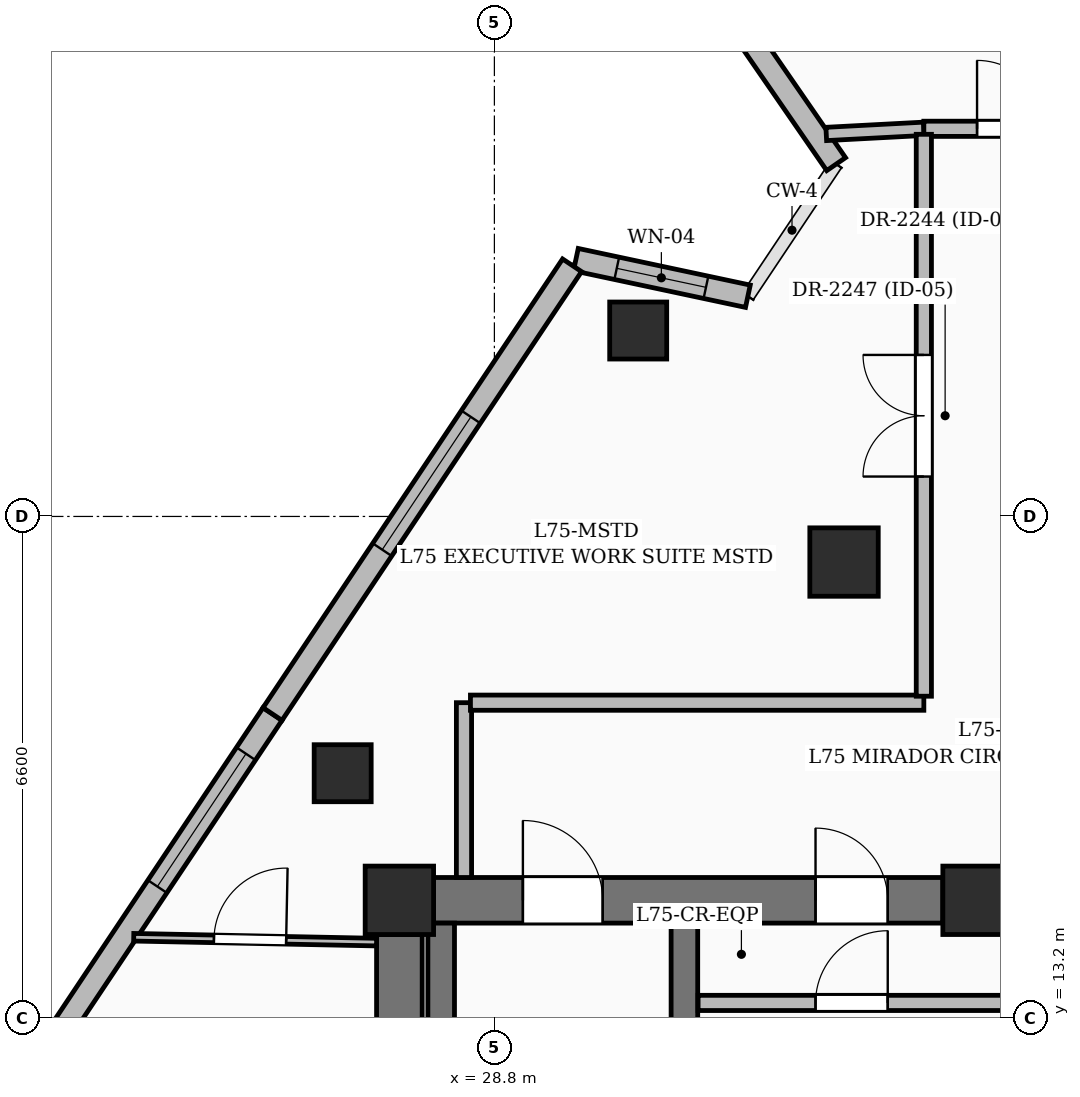
"""IFC4 building model, lengths in metres.
Left out: names, types, materials, properties, quantities, classifications, styles, units other than length and angle.
Written with IfcOpenShell. Run it as: python <this file> out.ifc"""

import sys

from ifc_helpers import new_model, si_unit, direction, frame, frame_2d, origin, origin_2d, place, context, subcontext, project, spatial, rectangle, extrude, element, fill, save


model = new_model("IFC4")
c1 = context("Model", 3, precision=1e-05, world=origin(), true_north=direction((0.0, 1.0)))
c2 = subcontext(c1, "Body", "Model", "MODEL_VIEW")
j1 = project(units=[si_unit("LENGTHUNIT", "METRE"), si_unit("PLANEANGLEUNIT", "RADIAN")], contexts=[c1])
p1 = place(None, origin())
s1 = spatial("IfcSite", under=j1, at=p1, CompositionType="ELEMENT")
p2 = place(p1, origin())
s2 = spatial("IfcBuilding", under=s1, at=p2, CompositionType="ELEMENT")
p3 = place(p2, frame((0.0, 0.0, 289.5)))
s3 = spatial("IfcBuildingStorey", under=s2, at=p3, CompositionType="ELEMENT", Elevation=289.5)
for number, where, z_axis, x_axis in (
    (1, (27.55, 14.75, 0.0), (0.0, 0.0, 1.0), (1.0, 0.0, 0.0)),
    (2, (35.15, 14.75, 0.0), (0.0, 0.0, 1.0), (1.0, 0.0, 0.0)),
    (3, (33.4, 19.2, 0.0), (0.0, 0.0, 1.0), (1.0, 0.0, 0.0)),
):
    element("IfcColumn", number, at=place(p3, frame(where, z_axis=z_axis, x_axis=x_axis)), inside=s3, PredefinedType="COLUMN", context=c2, shape_type="SweptSolid", body=[
        extrude(rectangle(XDim=0.9, YDim=0.9, at=origin_2d()), origin(), (0.0, 0.0, 1.0), 4.5),
    ])
p4 = place(p3, frame((28.0, 14.75, 0.0), z_axis=(0.0, 0.0, 1.0), x_axis=(1.0, 0.0, 0.0)))
e4 = element("IfcWall", 4, at=p4, inside=s3, PredefinedType="SHEAR", context=c2, shape_type="SweptSolid", body=[
    extrude(rectangle(XDim=6.7, YDim=0.6, at=frame_2d((3.35, 0.0))), origin(), (0.0, 0.0, 1.0), 4.5),
])
p5 = place(p4, frame((1.175, 0.0, 0.0)))
e5 = element("IfcOpeningElement", 5, at=p5, cuts=e4, PredefinedType="OPENING", context=c2, shape_type="SweptSolid", body=[
    extrude(rectangle(XDim=1.05, YDim=2.15, at=frame_2d((0.525, 1.075))), frame((0.0, 0.31, 0.0), z_axis=(0.0, -1.0, 0.0), x_axis=(1.0, 0.0, 0.0)), (0.0, 0.0, 1.0), 0.62),
])
p6 = place(p4, frame((5.025, 0.0, 0.0)))
e6 = element("IfcOpeningElement", 6, at=p6, cuts=e4, PredefinedType="OPENING", context=c2, shape_type="SweptSolid", body=[
    extrude(rectangle(XDim=0.95, YDim=2.15, at=frame_2d((0.475, 1.075))), frame((0.0, 0.31, 0.0), z_axis=(0.0, -1.0, 0.0), x_axis=(1.0, 0.0, 0.0)), (0.0, 0.0, 1.0), 0.62),
])
p7 = place(p3, frame((27.55, 5.0, 0.0), z_axis=(0.0, 0.0, 1.0), x_axis=(0.0, 1.0, 0.0)))
e7 = element("IfcWall", 7, at=p7, inside=s3, PredefinedType="SHEAR", context=c2, shape_type="SweptSolid", body=[
    extrude(rectangle(XDim=9.3, YDim=0.6, at=frame_2d((4.65, 0.0))), origin(), (0.0, 0.0, 1.0), 4.5),
])
p8 = place(p3, frame((28.1, 5.2, 0.0), z_axis=(0.0, 0.0, 1.0), x_axis=(0.0, 1.0, 0.0)))
e8 = element("IfcWall", 8, at=p8, inside=s3, PredefinedType="SOLIDWALL", context=c2, shape_type="SweptSolid", body=[
    extrude(rectangle(XDim=9.25, YDim=0.35, at=frame_2d((4.625, 0.0))), origin(), (0.0, 0.0, 1.0), 4.5),
])
p9 = place(p3, frame((31.3, 5.2, 0.0), z_axis=(0.0, 0.0, 1.0), x_axis=(0.0, 1.0, 0.0)))
e9 = element("IfcWall", 9, at=p9, inside=s3, PredefinedType="SOLIDWALL", context=c2, shape_type="SweptSolid", body=[
    extrude(rectangle(XDim=9.25, YDim=0.35, at=frame_2d((4.625, 0.0))), origin(), (0.0, 0.0, 1.0), 4.5),
])
p10 = place(p9, frame((6.02, 0.0, 0.0)))
e10 = element("IfcOpeningElement", 10, at=p10, cuts=e9, PredefinedType="OPENING", context=c2, shape_type="SweptSolid", body=[
    extrude(rectangle(XDim=1.0, YDim=2.15, at=frame_2d((0.5, 1.075))), frame((0.0, 0.185, 0.0), z_axis=(0.0, -1.0, 0.0), x_axis=(1.0, 0.0, 0.0)), (0.0, 0.0, 1.0), 0.37),
])
for number, where, z_axis, x_axis in (
    (11, (30.692, 22.246, 0.0), (0.0, 0.0, 1.0), (1.0, 0.0, 0.0)),
    (12, (26.804, 16.422, 0.0), (0.0, 0.0, 1.0), (1.0, 0.0, 0.0)),
):
    element("IfcColumn", number, at=place(p3, frame(where, z_axis=z_axis, x_axis=x_axis)), inside=s3, PredefinedType="COLUMN", context=c2, shape_type="SweptSolid", body=[
        extrude(rectangle(XDim=0.75, YDim=0.75, at=origin_2d()), origin(), (0.0, 0.0, 1.0), 4.5),
    ])
p11 = place(p3, frame((29.872, 23.179, 0.0), z_axis=(0.0, 0.0, 1.0), x_axis=(0.978065695184, -0.208296653608, 0.0)))
e13 = element("IfcWall", 13, at=p11, inside=s3, PredefinedType="SOLIDWALL", context=c2, shape_type="SweptSolid", body=[
    extrude(rectangle(XDim=2.314, YDim=0.3, at=frame_2d((1.157, 0.0))), origin(), (0.0, 0.0, 1.0), 3.396),
])
p12 = place(p11, frame((0.55, 0.0, 0.8)))
e14 = element("IfcOpeningElement", 14, at=p12, cuts=e13, PredefinedType="OPENING", context=c2, shape_type="SweptSolid", body=[
    extrude(rectangle(XDim=1.2, YDim=1.8, at=frame_2d((0.6, 0.9))), frame((0.0, 0.16, 0.0), z_axis=(0.0, -1.0, 0.0), x_axis=(1.0, 0.0, 0.0)), (0.0, 0.0, 1.0), 0.32),
])
p13 = place(p3, frame((33.296, 24.435, 0.0), z_axis=(0.0, 0.0, 1.0), x_axis=(-0.567777329438, 0.823182181644, 0.0)))
e15 = element("IfcWall", 15, at=p13, inside=s3, PredefinedType="SOLIDWALL", context=c2, shape_type="SweptSolid", body=[
    extrude(rectangle(XDim=2.314, YDim=0.3, at=frame_2d((1.157, 0.0))), origin(), (0.0, 0.0, 1.0), 3.396),
])
p14 = place(p3, frame((21.812, 11.105, 0.0), z_axis=(0.0, 0.0, 1.0), x_axis=(0.555222871335, 0.831701607036, 0.0)))
e16 = element("IfcWall", 16, at=p14, inside=s3, PredefinedType="SOLIDWALL", context=c2, shape_type="SweptSolid", body=[
    extrude(rectangle(XDim=7.328, YDim=0.3, at=frame_2d((3.664, 0.0))), origin(), (0.0, 0.0, 1.0), 4.2),
])
p15 = place(p14, frame((4.6, 0.0, 0.55)))
e17 = element("IfcOpeningElement", 17, at=p15, cuts=e16, PredefinedType="OPENING", context=c2, shape_type="SweptSolid", body=[
    extrude(rectangle(XDim=2.1, YDim=2.4, at=frame_2d((1.05, 1.2))), frame((0.0, 0.16, 0.0), z_axis=(0.0, -1.0, 0.0), x_axis=(1.0, 0.0, 0.0)), (0.0, 0.0, 1.0), 0.32),
])
p16 = place(p3, frame((25.881, 17.2, 0.0), z_axis=(0.0, 0.0, 1.0), x_axis=(0.555231876215, 0.831695595537, 0.0)))
e18 = element("IfcWall", 18, at=p16, inside=s3, PredefinedType="SOLIDWALL", context=c2, shape_type="SweptSolid", body=[
    extrude(rectangle(XDim=7.098, YDim=0.3, at=frame_2d((3.549, 0.0))), origin(), (0.0, 0.0, 1.0), 4.2),
])
p17 = place(p16, frame((2.6, 0.0, 0.55)))
e19 = element("IfcOpeningElement", 19, at=p17, cuts=e18, PredefinedType="OPENING", context=c2, shape_type="SweptSolid", body=[
    extrude(rectangle(XDim=2.1, YDim=2.4, at=frame_2d((1.05, 1.2))), frame((0.0, 0.16, 0.0), z_axis=(0.0, -1.0, 0.0), x_axis=(1.0, 0.0, 0.0)), (0.0, 0.0, 1.0), 0.32),
])
p18 = place(p3, frame((34.72, 14.75, 0.0), z_axis=(0.0, 0.0, 1.0), x_axis=(1.0, 0.0, 0.0)))
e20 = element("IfcWall", 20, at=p18, inside=s3, PredefinedType="PARTITIONING", context=c2, shape_type="SweptSolid", body=[
    extrude(rectangle(XDim=0.935, YDim=0.2, at=frame_2d((0.468, 0.0))), origin(), (0.0, 0.0, 1.0), 3.385),
])
p19 = place(p3, frame((31.48, 13.4, 0.0), z_axis=(0.0, 0.0, 1.0), x_axis=(1.0, 0.0, 0.0)))
e21 = element("IfcWall", 21, at=p19, inside=s3, PredefinedType="PARTITIONING", context=c2, shape_type="SweptSolid", body=[
    extrude(rectangle(XDim=4.04, YDim=0.2, at=frame_2d((2.02, 0.0))), origin(), (0.0, 0.0, 1.0), 4.2),
])
p20 = place(p19, frame((1.545, 0.0, 0.0)))
e22 = element("IfcOpeningElement", 22, at=p20, cuts=e21, PredefinedType="OPENING", context=c2, shape_type="SweptSolid", body=[
    extrude(rectangle(XDim=0.95, YDim=2.15, at=frame_2d((0.475, 1.075))), frame((0.0, 0.11, 0.0), z_axis=(0.0, -1.0, 0.0), x_axis=(1.0, 0.0, 0.0)), (0.0, 0.0, 1.0), 0.22),
])
p21 = place(p3, frame((33.166, 24.832, 0.0), z_axis=(0.0, 0.0, 1.0), x_axis=(0.998605738501, 0.052788057673, 0.0)))
e23 = element("IfcWall", 23, at=p21, inside=s3, PredefinedType="PARTITIONING", context=c2, shape_type="SweptSolid", body=[
    extrude(rectangle(XDim=1.286, YDim=0.175, at=frame_2d((0.643, 0.0))), origin(), (0.0, 0.0, 1.0), 4.2),
])
p22 = place(p3, frame((34.45, 24.9, 0.0), z_axis=(0.0, 0.0, 1.0), x_axis=(1.0, 0.0, 0.0)))
e24 = element("IfcWall", 24, at=p22, inside=s3, PredefinedType="PARTITIONING", context=c2, shape_type="SweptSolid", body=[
    extrude(rectangle(XDim=2.288, YDim=0.2, at=frame_2d((1.144, 0.0))), origin(), (0.0, 0.0, 1.0), 3.535),
])
p23 = place(p22, frame((0.7, 0.0, 0.0)))
e25 = element("IfcOpeningElement", 25, at=p23, cuts=e24, PredefinedType="OPENING", context=c2, shape_type="SweptSolid", body=[
    extrude(rectangle(XDim=0.9, YDim=2.1, at=frame_2d((0.45, 1.05))), frame((0.0, 0.11, 0.0), z_axis=(0.0, -1.0, 0.0), x_axis=(1.0, 0.0, 0.0)), (0.0, 0.0, 1.0), 0.22),
])
p24 = place(p3, frame((28.4, 15.05, 0.0), z_axis=(0.0, 0.0, 1.0), x_axis=(0.0, 1.0, 0.0)))
e26 = element("IfcWall", 26, at=p24, inside=s3, PredefinedType="PARTITIONING", context=c2, shape_type="SweptSolid", body=[
    extrude(rectangle(XDim=2.3, YDim=0.2, at=frame_2d((1.15, 0.0))), origin(), (0.0, 0.0, 1.0), 3.535),
])
p25 = place(p3, frame((28.485, 17.35, 0.0), z_axis=(0.0, 0.0, 1.0), x_axis=(1.0, 0.0, 0.0)))
e27 = element("IfcWall", 27, at=p25, inside=s3, PredefinedType="PARTITIONING", context=c2, shape_type="SweptSolid", body=[
    extrude(rectangle(XDim=5.965, YDim=0.2, at=frame_2d((2.982, 0.0))), origin(), (0.0, 0.0, 1.0), 3.535),
])
p26 = place(p3, frame((34.45, 17.435, 0.0), z_axis=(0.0, 0.0, 1.0), x_axis=(0.0, 1.0, 0.0)))
e28 = element("IfcWall", 28, at=p26, inside=s3, PredefinedType="PARTITIONING", context=c2, shape_type="SweptSolid", body=[
    extrude(rectangle(XDim=7.392, YDim=0.2, at=frame_2d((3.696, 0.0))), origin(), (0.0, 0.0, 1.0), 3.86),
])
p27 = place(p26, frame((2.89, 0.0, 0.0)))
e29 = element("IfcOpeningElement", 29, at=p27, cuts=e28, PredefinedType="OPENING", context=c2, shape_type="SweptSolid", body=[
    extrude(rectangle(XDim=1.6, YDim=2.3, at=frame_2d((0.8, 1.15))), frame((0.0, 0.11, 0.0), z_axis=(0.0, -1.0, 0.0), x_axis=(1.0, 0.0, 0.0)), (0.0, 0.0, 1.0), 0.22),
])
p28 = place(p3, frame((24.055, 14.264, 0.0), z_axis=(0.0, 0.0, 1.0), x_axis=(0.99979966268, -0.020015856317, 0.0)))
e30 = element("IfcWall", 30, at=p28, inside=s3, PredefinedType="PARTITIONING", context=c2, shape_type="SweptSolid", body=[
    extrude(rectangle(XDim=3.196, YDim=0.1, at=frame_2d((1.598, 0.0))), origin(), (0.0, 0.0, 1.0), 3.391),
])
p29 = place(p28, frame((1.056, 0.0, 0.0)))
e31 = element("IfcOpeningElement", 31, at=p29, cuts=e30, PredefinedType="OPENING", context=c2, shape_type="SweptSolid", body=[
    extrude(rectangle(XDim=0.95, YDim=2.2, at=frame_2d((0.475, 1.1))), frame((0.0, 0.06, 0.0), z_axis=(0.0, -1.0, 0.0), x_axis=(1.0, 0.0, 0.0)), (0.0, 0.0, 1.0), 0.12),
])
p30 = place(p12, origin())
e32 = element("IfcWindow", 32, at=p30, inside=s3, PartitioningType="SINGLE_PANEL", PredefinedType="WINDOW", context=c2, shape_type="SweptSolid", body=[
    extrude(rectangle(XDim=1.2, YDim=1.8, at=frame_2d((0.6, 0.9))), frame((0.0, 0.03, 0.0), z_axis=(0.0, -1.0, 0.0), x_axis=(1.0, 0.0, 0.0)), (0.0, 0.0, 1.0), 0.06),
])
fill(e14, e32)
p31 = place(p15, origin())
e33 = element("IfcWindow", 33, at=p31, inside=s3, PartitioningType="SINGLE_PANEL", PredefinedType="WINDOW", context=c2, shape_type="SweptSolid", body=[
    extrude(rectangle(XDim=2.1, YDim=2.4, at=frame_2d((1.05, 1.2))), frame((0.0, 0.03, 0.0), z_axis=(0.0, -1.0, 0.0), x_axis=(1.0, 0.0, 0.0)), (0.0, 0.0, 1.0), 0.06),
])
fill(e17, e33)
p32 = place(p17, origin())
e34 = element("IfcWindow", 34, at=p32, inside=s3, PartitioningType="SINGLE_PANEL", PredefinedType="WINDOW", context=c2, shape_type="SweptSolid", body=[
    extrude(rectangle(XDim=2.1, YDim=2.4, at=frame_2d((1.05, 1.2))), frame((0.0, 0.03, 0.0), z_axis=(0.0, -1.0, 0.0), x_axis=(1.0, 0.0, 0.0)), (0.0, 0.0, 1.0), 0.06),
])
fill(e19, e34)
p33 = place(p5, origin())
e35 = element("IfcDoor", 35, at=p33, inside=s3, OperationType="SINGLE_SWING_LEFT", PredefinedType="DOOR", context=c2, shape_type="SweptSolid", body=[
    extrude(rectangle(XDim=1.05, YDim=2.15, at=frame_2d((0.525, 1.075))), frame((0.0, 0.025, 0.0), z_axis=(0.0, -1.0, 0.0), x_axis=(1.0, 0.0, 0.0)), (0.0, 0.0, 1.0), 0.05),
])
fill(e5, e35)
p34 = place(p20, origin())
e36 = element("IfcDoor", 36, at=p34, inside=s3, OperationType="SINGLE_SWING_RIGHT", PredefinedType="DOOR", context=c2, shape_type="SweptSolid", body=[
    extrude(rectangle(XDim=0.95, YDim=2.15, at=frame_2d((0.475, 1.075))), frame((0.0, 0.025, 0.0), z_axis=(0.0, -1.0, 0.0), x_axis=(1.0, 0.0, 0.0)), (0.0, 0.0, 1.0), 0.05),
])
fill(e22, e36)
p35 = place(p6, origin())
e37 = element("IfcDoor", 37, at=p35, inside=s3, OperationType="SINGLE_SWING_LEFT", PredefinedType="DOOR", context=c2, shape_type="SweptSolid", body=[
    extrude(rectangle(XDim=0.95, YDim=2.15, at=frame_2d((0.475, 1.075))), frame((0.0, 0.025, 0.0), z_axis=(0.0, -1.0, 0.0), x_axis=(1.0, 0.0, 0.0)), (0.0, 0.0, 1.0), 0.05),
])
fill(e6, e37)
p36 = place(p23, origin())
e38 = element("IfcDoor", 38, at=p36, inside=s3, OperationType="SINGLE_SWING_LEFT", PredefinedType="DOOR", context=c2, shape_type="SweptSolid", body=[
    extrude(rectangle(XDim=0.9, YDim=2.1, at=frame_2d((0.45, 1.05))), frame((0.0, 0.025, 0.0), z_axis=(0.0, -1.0, 0.0), x_axis=(1.0, 0.0, 0.0)), (0.0, 0.0, 1.0), 0.05),
])
fill(e25, e38)
p37 = place(p27, origin())
e39 = element("IfcDoor", 39, at=p37, inside=s3, OperationType="DOUBLE_DOOR_SINGLE_SWING", PredefinedType="DOOR", context=c2, shape_type="SweptSolid", body=[
    extrude(rectangle(XDim=1.6, YDim=2.3, at=frame_2d((0.8, 1.15))), frame((0.0, 0.025, 0.0), z_axis=(0.0, -1.0, 0.0), x_axis=(1.0, 0.0, 0.0)), (0.0, 0.0, 1.0), 0.05),
])
fill(e29, e39)
p38 = place(p29, origin())
e40 = element("IfcDoor", 40, at=p38, inside=s3, OperationType="SINGLE_SWING_RIGHT", PredefinedType="DOOR", context=c2, shape_type="SweptSolid", body=[
    extrude(rectangle(XDim=0.95, YDim=2.2, at=frame_2d((0.475, 1.1))), frame((0.0, 0.025, 0.0), z_axis=(0.0, -1.0, 0.0), x_axis=(1.0, 0.0, 0.0)), (0.0, 0.0, 1.0), 0.05),
])
fill(e31, e40)
save(model, sys.argv[1])
